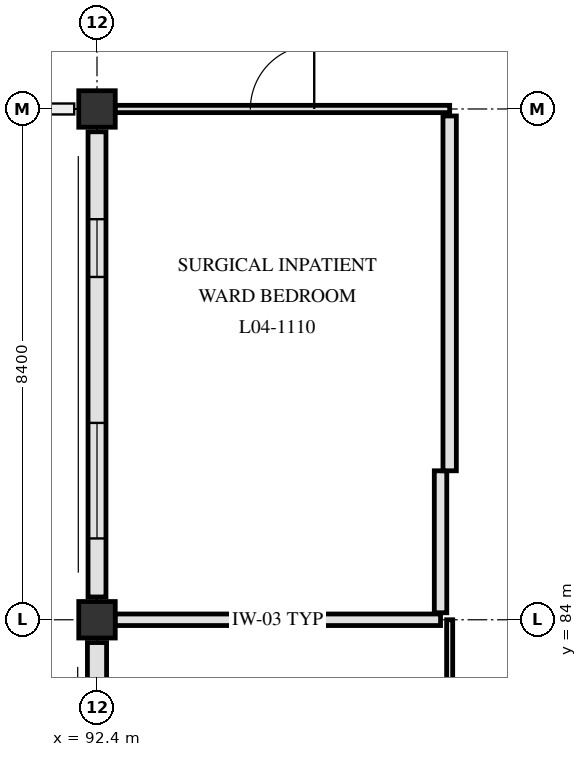
"""IFC4 building model, lengths in metres.
Left out: names, types, materials, properties, quantities, classifications, styles, units other than length and angle.
Written with IfcOpenShell. Run it as: python <this file> out.ifc"""

import sys

from ifc_helpers import new_model, si_unit, direction, frame, frame_2d, origin, origin_2d, place, context, subcontext, project, spatial, rectangle, extrude, element, fill, save


model = new_model("IFC4")
c1 = context("Model", 3, precision=1e-05, world=origin(), true_north=direction((0.0, 1.0)))
c2 = subcontext(c1, "Body", "Model", "MODEL_VIEW")
j1 = project(units=[si_unit("LENGTHUNIT", "METRE"), si_unit("PLANEANGLEUNIT", "RADIAN")], contexts=[c1])
p1 = place(None, origin())
s1 = spatial("IfcSite", under=j1, at=p1, CompositionType="ELEMENT")
p2 = place(p1, origin())
s2 = spatial("IfcBuilding", under=s1, at=p2, CompositionType="ELEMENT")
p3 = place(p2, frame((0.0, 0.0, 18.6)))
s3 = spatial("IfcBuildingStorey", under=s2, at=p3, CompositionType="ELEMENT", Elevation=18.6)
for number, where, z_axis, x_axis in (
    (1, (92.4, 84.0, 0.0), (0.0, 0.0, 1.0), (1.0, 0.0, 0.0)),
    (2, (92.4, 92.4, 0.0), (0.0, 0.0, 1.0), (1.0, 0.0, 0.0)),
):
    element("IfcColumn", number, at=place(p3, frame(where, z_axis=z_axis, x_axis=x_axis)), inside=s3, PredefinedType="COLUMN", context=c2, shape_type="SweptSolid", body=[
        extrude(rectangle(XDim=0.6, YDim=0.6, at=origin_2d()), origin(), (0.0, 0.0, 1.0), 3.9),
    ])
p4 = place(p3, frame((92.4, 75.975, 0.0), z_axis=(0.0, 0.0, 1.0), x_axis=(0.0, 1.0, 0.0)))
e3 = element("IfcWall", 3, at=p4, inside=s3, PredefinedType="SOLIDWALL", context=c2, shape_type="SweptSolid", body=[
    extrude(rectangle(XDim=7.65, YDim=0.315, at=frame_2d((3.825, 0.0))), origin(), (0.0, 0.0, 1.0), 3.31),
])
p5 = place(p4, frame((1.113, 0.0, 0.85)))
e4 = element("IfcOpeningElement", 4, at=p5, cuts=e3, PredefinedType="OPENING", context=c2, shape_type="SweptSolid", body=[
    extrude(rectangle(XDim=1.6, YDim=1.78, at=frame_2d((0.8, 0.89))), frame((0.0, 0.167, 0.0), z_axis=(0.0, -1.0, 0.0), x_axis=(1.0, 0.0, 0.0)), (0.0, 0.0, 1.0), 0.335),
])
p6 = place(p4, frame((4.863, 0.0, 0.85)))
e5 = element("IfcOpeningElement", 5, at=p6, cuts=e3, PredefinedType="OPENING", context=c2, shape_type="SweptSolid", body=[
    extrude(rectangle(XDim=1.75, YDim=1.78, at=frame_2d((0.875, 0.89))), frame((0.0, 0.167, 0.0), z_axis=(0.0, -1.0, 0.0), x_axis=(1.0, 0.0, 0.0)), (0.0, 0.0, 1.0), 0.335),
])
p7 = place(p3, frame((92.4, 84.375, 0.0), z_axis=(0.0, 0.0, 1.0), x_axis=(0.0, 1.0, 0.0)))
e6 = element("IfcWall", 6, at=p7, inside=s3, PredefinedType="SOLIDWALL", context=c2, shape_type="SweptSolid", body=[
    extrude(rectangle(XDim=7.65, YDim=0.295, at=frame_2d((3.825, 0.0))), origin(), (0.0, 0.0, 1.0), 3.31),
])
p8 = place(p7, frame((0.962, 0.0, 0.85)))
e7 = element("IfcOpeningElement", 7, at=p8, cuts=e6, PredefinedType="OPENING", context=c2, shape_type="SweptSolid", body=[
    extrude(rectangle(XDim=1.9, YDim=1.78, at=frame_2d((0.95, 0.89))), frame((0.0, 0.157, 0.0), z_axis=(0.0, -1.0, 0.0), x_axis=(1.0, 0.0, 0.0)), (0.0, 0.0, 1.0), 0.315),
])
p9 = place(p7, frame((5.262, 0.0, 0.85)))
e8 = element("IfcOpeningElement", 8, at=p9, cuts=e6, PredefinedType="OPENING", context=c2, shape_type="SweptSolid", body=[
    extrude(rectangle(XDim=0.95, YDim=1.3, at=frame_2d((0.475, 0.65))), frame((0.0, 0.157, 0.0), z_axis=(0.0, -1.0, 0.0), x_axis=(1.0, 0.0, 0.0)), (0.0, 0.0, 1.0), 0.315),
])
p10 = place(p3, frame((92.695, 84.0, 0.0), z_axis=(0.0, 0.0, 1.0), x_axis=(1.0, 0.0, 0.0)))
e9 = element("IfcWall", 9, at=p10, inside=s3, PredefinedType="PARTITIONING", context=c2, shape_type="SweptSolid", body=[
    extrude(rectangle(XDim=5.355, YDim=0.19, at=frame_2d((2.677, 0.0))), origin(), (0.0, 0.0, 1.0), 3.16),
])
p11 = place(p3, frame((92.695, 92.4, 0.0), z_axis=(0.0, 0.0, 1.0), x_axis=(1.0, 0.0, 0.0)))
e10 = element("IfcWall", 10, at=p11, inside=s3, PredefinedType="PARTITIONING", context=c2, shape_type="SweptSolid", body=[
    extrude(rectangle(XDim=5.505, YDim=0.12, at=frame_2d((2.752, 0.0))), origin(), (0.0, 0.0, 1.0), 3.16),
])
p12 = place(p11, frame((2.228, 0.0, 0.0)))
e11 = element("IfcOpeningElement", 11, at=p12, cuts=e10, PredefinedType="OPENING", context=c2, shape_type="SweptSolid", body=[
    extrude(rectangle(XDim=1.05, YDim=2.15, at=frame_2d((0.525, 1.075))), frame((0.0, 0.07, 0.0), z_axis=(0.0, -1.0, 0.0), x_axis=(1.0, 0.0, 0.0)), (0.0, 0.0, 1.0), 0.14),
])
p13 = place(p3, frame((98.05, 84.115, 0.0), z_axis=(0.0, 0.0, 1.0), x_axis=(0.0, 1.0, 0.0)))
e12 = element("IfcWall", 12, at=p13, inside=s3, PredefinedType="PARTITIONING", context=c2, shape_type="SweptSolid", body=[
    extrude(rectangle(XDim=2.335, YDim=0.205, at=frame_2d((1.167, 0.0))), origin(), (0.0, 0.0, 1.0), 3.61),
])
p14 = place(p3, frame((98.2, 78.315, 0.0), z_axis=(0.0, 0.0, 1.0), x_axis=(0.0, 1.0, 0.0)))
e13 = element("IfcWall", 13, at=p14, inside=s3, PredefinedType="PARTITIONING", context=c2, shape_type="SweptSolid", body=[
    extrude(rectangle(XDim=5.685, YDim=0.1, at=frame_2d((2.843, 0.0))), origin(), (0.0, 0.0, 1.0), 3.16),
])
p15 = place(p3, frame((98.2, 86.45, 0.0), z_axis=(0.0, 0.0, 1.0), x_axis=(0.0, 1.0, 0.0)))
e14 = element("IfcWall", 14, at=p15, inside=s3, PredefinedType="PARTITIONING", context=c2, shape_type="SweptSolid", body=[
    extrude(rectangle(XDim=5.835, YDim=0.22, at=frame_2d((2.917, 0.0))), origin(), (0.0, 0.0, 1.0), 3.31),
])
p16 = place(p8, origin())
e15 = element("IfcWindow", 15, at=p16, inside=s3, PartitioningType="SINGLE_PANEL", PredefinedType="WINDOW", context=c2, shape_type="SweptSolid", body=[
    extrude(rectangle(XDim=1.9, YDim=1.78, at=frame_2d((0.95, 0.89))), frame((0.0, 0.03, 0.0), z_axis=(0.0, -1.0, 0.0), x_axis=(1.0, 0.0, 0.0)), (0.0, 0.0, 1.0), 0.06),
])
fill(e7, e15)
p17 = place(p9, origin())
e16 = element("IfcWindow", 16, at=p17, inside=s3, PartitioningType="SINGLE_PANEL", PredefinedType="WINDOW", context=c2, shape_type="SweptSolid", body=[
    extrude(rectangle(XDim=0.95, YDim=1.3, at=frame_2d((0.475, 0.65))), frame((0.0, 0.03, 0.0), z_axis=(0.0, -1.0, 0.0), x_axis=(1.0, 0.0, 0.0)), (0.0, 0.0, 1.0), 0.06),
])
fill(e8, e16)
p18 = place(p12, origin())
e17 = element("IfcDoor", 17, at=p18, inside=s3, OperationType="SINGLE_SWING_RIGHT", PredefinedType="DOOR", context=c2, shape_type="SweptSolid", body=[
    extrude(rectangle(XDim=1.05, YDim=2.15, at=frame_2d((0.525, 1.075))), frame((0.0, 0.025, 0.0), z_axis=(0.0, -1.0, 0.0), x_axis=(1.0, 0.0, 0.0)), (0.0, 0.0, 1.0), 0.05),
])
fill(e11, e17)
save(model, sys.argv[1])
